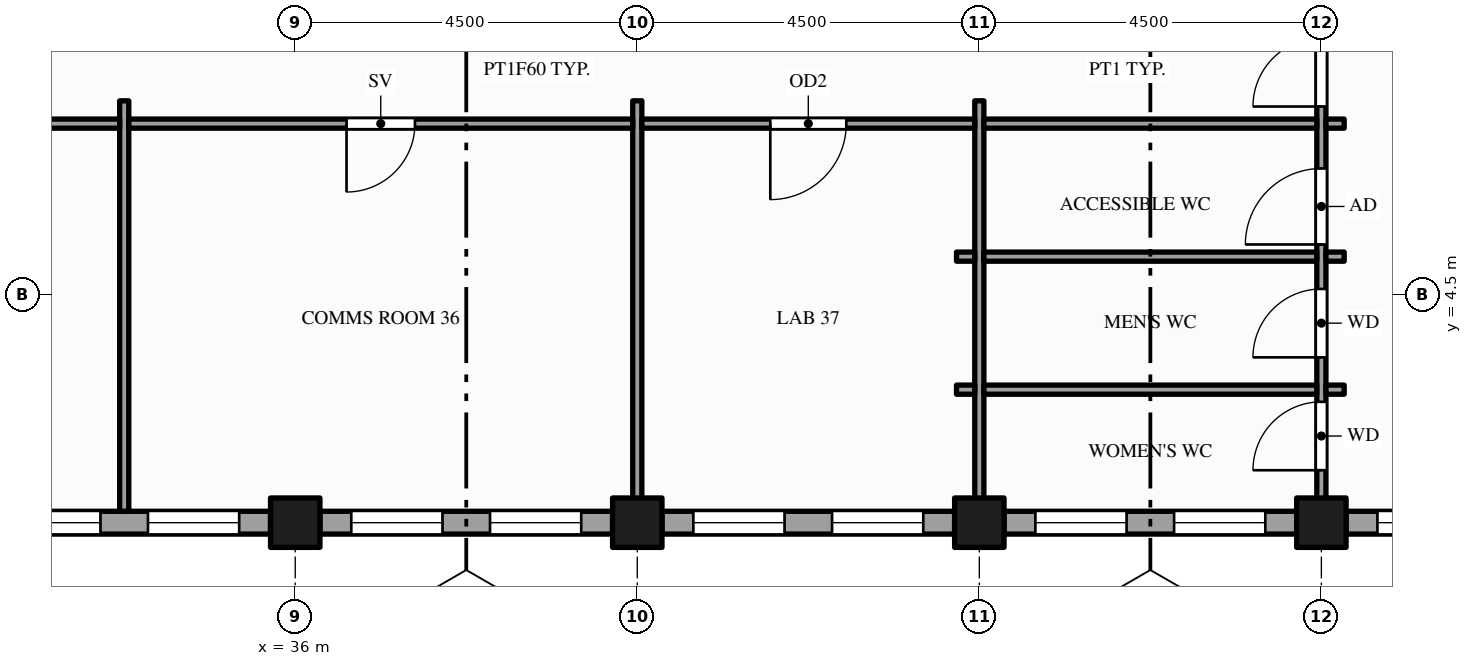
"""IFC4 building model, lengths in metres.
Left out: names, types, materials, properties, quantities, classifications, styles, units other than length and angle.
Written with IfcOpenShell. Run it as: python <this file> out.ifc"""

import sys

from ifc_helpers import new_model, si_unit, direction, frame, frame_2d, origin, origin_2d, place, context, subcontext, project, spatial, rectangle, hollow_rectangle, extrude, element, fill, save


model = new_model("IFC4")
c1 = context("Model", 3, precision=1e-05, world=origin(), true_north=direction((0.0, 1.0)))
c2 = subcontext(c1, "Body", "Model", "MODEL_VIEW")
j1 = project(units=[si_unit("LENGTHUNIT", "METRE"), si_unit("PLANEANGLEUNIT", "RADIAN")], contexts=[c1])
p1 = place(None, origin())
s1 = spatial("IfcSite", under=j1, at=p1, CompositionType="ELEMENT")
p2 = place(p1, origin())
s2 = spatial("IfcBuilding", under=s1, at=p2, CompositionType="ELEMENT")
p3 = place(p2, frame((0.0, 0.0, 273.0)))
s3 = spatial("IfcBuildingStorey", under=s2, at=p3, CompositionType="ELEMENT", Elevation=273.0)
for number, where, z_axis, x_axis in (
    (1, (36.0, 1.5, -0.15), (0.0, 0.0, 1.0), (1.0, 0.0, 0.0)),
    (2, (40.5, 1.5, -0.15), (0.0, 0.0, 1.0), (1.0, 0.0, 0.0)),
    (3, (45.0, 1.5, -0.15), (0.0, 0.0, 1.0), (1.0, 0.0, 0.0)),
    (4, (49.5, 1.5, -0.15), (0.0, 0.0, 1.0), (1.0, 0.0, 0.0)),
):
    element("IfcColumn", number, at=place(p3, frame(where, z_axis=z_axis, x_axis=x_axis)), inside=s3, PredefinedType="COLUMN", context=c2, shape_type="SweptSolid", body=[
        extrude(hollow_rectangle(XDim=0.65, YDim=0.65, WallThickness=0.032, at=origin_2d()), origin(), (0.0, 0.0, 1.0), 4.0),
    ])
p4 = place(p3, frame((31.825, 1.5, 0.0), z_axis=(0.0, 0.0, 1.0), x_axis=(1.0, 0.0, 0.0)))
e5 = element("IfcWall", 5, at=p4, inside=s3, PredefinedType="STANDARD", context=c2, shape_type="SweptSolid", body=[
    extrude(rectangle(XDim=3.85, YDim=0.3, at=frame_2d((1.925, 0.0))), origin(), (0.0, 0.0, 1.0), 2.87),
])
p5 = place(p4, frame((0.413, 0.0, 0.9)))
e6 = element("IfcOpeningElement", 6, at=p5, cuts=e5, PredefinedType="OPENING", context=c2, shape_type="SweptSolid", body=[
    extrude(rectangle(XDim=1.2, YDim=1.75, at=frame_2d((0.6, 0.875))), frame((0.0, 0.16, 0.0), z_axis=(0.0, -1.0, 0.0), x_axis=(1.0, 0.0, 0.0)), (0.0, 0.0, 1.0), 0.32),
])
p6 = place(p4, frame((2.238, 0.0, 0.9)))
e7 = element("IfcOpeningElement", 7, at=p6, cuts=e5, PredefinedType="OPENING", context=c2, shape_type="SweptSolid", body=[
    extrude(rectangle(XDim=1.2, YDim=1.75, at=frame_2d((0.6, 0.875))), frame((0.0, 0.16, 0.0), z_axis=(0.0, -1.0, 0.0), x_axis=(1.0, 0.0, 0.0)), (0.0, 0.0, 1.0), 0.32),
])
p7 = place(p3, frame((36.325, 1.5, 0.0), z_axis=(0.0, 0.0, 1.0), x_axis=(1.0, 0.0, 0.0)))
e8 = element("IfcWall", 8, at=p7, inside=s3, PredefinedType="STANDARD", context=c2, shape_type="SweptSolid", body=[
    extrude(rectangle(XDim=3.85, YDim=0.3, at=frame_2d((1.925, 0.0))), origin(), (0.0, 0.0, 1.0), 2.87),
])
p8 = place(p7, frame((0.413, 0.0, 0.9)))
e9 = element("IfcOpeningElement", 9, at=p8, cuts=e8, PredefinedType="OPENING", context=c2, shape_type="SweptSolid", body=[
    extrude(rectangle(XDim=1.2, YDim=1.75, at=frame_2d((0.6, 0.875))), frame((0.0, 0.16, 0.0), z_axis=(0.0, -1.0, 0.0), x_axis=(1.0, 0.0, 0.0)), (0.0, 0.0, 1.0), 0.32),
])
p9 = place(p7, frame((2.238, 0.0, 0.9)))
e10 = element("IfcOpeningElement", 10, at=p9, cuts=e8, PredefinedType="OPENING", context=c2, shape_type="SweptSolid", body=[
    extrude(rectangle(XDim=1.2, YDim=1.75, at=frame_2d((0.6, 0.875))), frame((0.0, 0.16, 0.0), z_axis=(0.0, -1.0, 0.0), x_axis=(1.0, 0.0, 0.0)), (0.0, 0.0, 1.0), 0.32),
])
p10 = place(p3, frame((40.825, 1.5, 0.0), z_axis=(0.0, 0.0, 1.0), x_axis=(1.0, 0.0, 0.0)))
e11 = element("IfcWall", 11, at=p10, inside=s3, PredefinedType="STANDARD", context=c2, shape_type="SweptSolid", body=[
    extrude(rectangle(XDim=3.85, YDim=0.3, at=frame_2d((1.925, 0.0))), origin(), (0.0, 0.0, 1.0), 2.87),
])
p11 = place(p10, frame((0.413, 0.0, 0.9)))
e12 = element("IfcOpeningElement", 12, at=p11, cuts=e11, PredefinedType="OPENING", context=c2, shape_type="SweptSolid", body=[
    extrude(rectangle(XDim=1.2, YDim=1.75, at=frame_2d((0.6, 0.875))), frame((0.0, 0.16, 0.0), z_axis=(0.0, -1.0, 0.0), x_axis=(1.0, 0.0, 0.0)), (0.0, 0.0, 1.0), 0.32),
])
p12 = place(p10, frame((2.238, 0.0, 0.9)))
e13 = element("IfcOpeningElement", 13, at=p12, cuts=e11, PredefinedType="OPENING", context=c2, shape_type="SweptSolid", body=[
    extrude(rectangle(XDim=1.2, YDim=1.75, at=frame_2d((0.6, 0.875))), frame((0.0, 0.16, 0.0), z_axis=(0.0, -1.0, 0.0), x_axis=(1.0, 0.0, 0.0)), (0.0, 0.0, 1.0), 0.32),
])
p13 = place(p3, frame((45.325, 1.5, 0.0), z_axis=(0.0, 0.0, 1.0), x_axis=(1.0, 0.0, 0.0)))
e14 = element("IfcWall", 14, at=p13, inside=s3, PredefinedType="STANDARD", context=c2, shape_type="SweptSolid", body=[
    extrude(rectangle(XDim=3.85, YDim=0.3, at=frame_2d((1.925, 0.0))), origin(), (0.0, 0.0, 1.0), 2.87),
])
p14 = place(p13, frame((0.413, 0.0, 0.9)))
e15 = element("IfcOpeningElement", 15, at=p14, cuts=e14, PredefinedType="OPENING", context=c2, shape_type="SweptSolid", body=[
    extrude(rectangle(XDim=1.2, YDim=1.75, at=frame_2d((0.6, 0.875))), frame((0.0, 0.16, 0.0), z_axis=(0.0, -1.0, 0.0), x_axis=(1.0, 0.0, 0.0)), (0.0, 0.0, 1.0), 0.32),
])
p15 = place(p13, frame((2.238, 0.0, 0.9)))
e16 = element("IfcOpeningElement", 16, at=p15, cuts=e14, PredefinedType="OPENING", context=c2, shape_type="SweptSolid", body=[
    extrude(rectangle(XDim=1.2, YDim=1.75, at=frame_2d((0.6, 0.875))), frame((0.0, 0.16, 0.0), z_axis=(0.0, -1.0, 0.0), x_axis=(1.0, 0.0, 0.0)), (0.0, 0.0, 1.0), 0.32),
])
p16 = place(p3, frame((49.825, 1.5, 0.0), z_axis=(0.0, 0.0, 1.0), x_axis=(1.0, 0.0, 0.0)))
e17 = element("IfcWall", 17, at=p16, inside=s3, PredefinedType="STANDARD", context=c2, shape_type="SweptSolid", body=[
    extrude(rectangle(XDim=4.175, YDim=0.3, at=frame_2d((2.087, 0.0))), origin(), (0.0, 0.0, 1.0), 2.87),
])
p17 = place(p16, frame((0.413, 0.0, 0.9)))
e18 = element("IfcOpeningElement", 18, at=p17, cuts=e17, PredefinedType="OPENING", context=c2, shape_type="SweptSolid", body=[
    extrude(rectangle(XDim=1.2, YDim=1.75, at=frame_2d((0.6, 0.875))), frame((0.0, 0.16, 0.0), z_axis=(0.0, -1.0, 0.0), x_axis=(1.0, 0.0, 0.0)), (0.0, 0.0, 1.0), 0.32),
])
p18 = place(p16, frame((2.225, 0.0, 0.9)))
e19 = element("IfcOpeningElement", 19, at=p18, cuts=e17, PredefinedType="OPENING", context=c2, shape_type="SweptSolid", body=[
    extrude(rectangle(XDim=1.55, YDim=1.75, at=frame_2d((0.775, 0.875))), frame((0.0, 0.16, 0.0), z_axis=(0.0, -1.0, 0.0), x_axis=(1.0, 0.0, 0.0)), (0.0, 0.0, 1.0), 0.32),
])
for number, where, z_axis, x_axis in (
    (20, (33.75, 1.65, 0.0), (0.0, 0.0, 1.0), (0.0, 1.0, 0.0)),
    (21, (40.5, 1.65, 0.0), (0.0, 0.0, 1.0), (0.0, 1.0, 0.0)),
    (22, (45.0, 1.65, 0.0), (0.0, 0.0, 1.0), (0.0, 1.0, 0.0)),
):
    element("IfcWall", number, at=place(p3, frame(where, z_axis=z_axis, x_axis=x_axis)), inside=s3, PredefinedType="PARTITIONING", context=c2, shape_type="SweptSolid", body=[
        extrude(rectangle(XDim=5.4, YDim=0.12, at=frame_2d((2.7, 0.0))), origin(), (0.0, 0.0, 1.0), 2.87),
    ])
p19 = place(p3, frame((49.5, 1.65, 0.0), z_axis=(0.0, 0.0, 1.0), x_axis=(0.0, 1.0, 0.0)))
e23 = element("IfcWall", 23, at=p19, inside=s3, PredefinedType="PARTITIONING", context=c2, shape_type="SweptSolid", body=[
    extrude(rectangle(XDim=22.2, YDim=0.12, at=frame_2d((11.1, 0.0))), origin(), (0.0, 0.0, 1.0), 2.87),
])
p20 = place(p19, frame((5.325, 0.0, 0.0)))
e24 = element("IfcOpeningElement", 24, at=p20, cuts=e23, PredefinedType="OPENING", context=c2, shape_type="SweptSolid", body=[
    extrude(rectangle(XDim=1.8, YDim=2.1, at=frame_2d((0.9, 1.05))), frame((0.0, 0.07, 0.0), z_axis=(0.0, -1.0, 0.0), x_axis=(1.0, 0.0, 0.0)), (0.0, 0.0, 1.0), 0.14),
])
p21 = place(p19, frame((0.54, 0.0, 0.0)))
e25 = element("IfcOpeningElement", 25, at=p21, cuts=e23, PredefinedType="OPENING", context=c2, shape_type="SweptSolid", body=[
    extrude(rectangle(XDim=0.9, YDim=2.1, at=frame_2d((0.45, 1.05))), frame((0.0, 0.07, 0.0), z_axis=(0.0, -1.0, 0.0), x_axis=(1.0, 0.0, 0.0)), (0.0, 0.0, 1.0), 0.14),
])
p22 = place(p19, frame((2.025, 0.0, 0.0)))
e26 = element("IfcOpeningElement", 26, at=p22, cuts=e23, PredefinedType="OPENING", context=c2, shape_type="SweptSolid", body=[
    extrude(rectangle(XDim=0.9, YDim=2.1, at=frame_2d((0.45, 1.05))), frame((0.0, 0.07, 0.0), z_axis=(0.0, -1.0, 0.0), x_axis=(1.0, 0.0, 0.0)), (0.0, 0.0, 1.0), 0.14),
])
p23 = place(p19, frame((3.51, 0.0, 0.0)))
e27 = element("IfcOpeningElement", 27, at=p23, cuts=e23, PredefinedType="OPENING", context=c2, shape_type="SweptSolid", body=[
    extrude(rectangle(XDim=1.0, YDim=2.1, at=frame_2d((0.5, 1.05))), frame((0.0, 0.07, 0.0), z_axis=(0.0, -1.0, 0.0), x_axis=(1.0, 0.0, 0.0)), (0.0, 0.0, 1.0), 0.14),
])
p24 = place(p3, frame((44.7, 3.25, 0.0), z_axis=(0.0, 0.0, 1.0), x_axis=(1.0, 0.0, 0.0)))
e28 = element("IfcWall", 28, at=p24, inside=s3, PredefinedType="PARTITIONING", context=c2, shape_type="SweptSolid", body=[
    extrude(rectangle(XDim=0.24, YDim=0.12, at=frame_2d((0.12, 0.0))), origin(), (0.0, 0.0, 1.0), 2.87),
])
p25 = place(p3, frame((45.06, 3.25, 0.0), z_axis=(0.0, 0.0, 1.0), x_axis=(1.0, 0.0, 0.0)))
e29 = element("IfcWall", 29, at=p25, inside=s3, PredefinedType="PARTITIONING", context=c2, shape_type="SweptSolid", body=[
    extrude(rectangle(XDim=4.38, YDim=0.12, at=frame_2d((2.19, 0.0))), origin(), (0.0, 0.0, 1.0), 2.87),
])
for number, where, z_axis, x_axis in (
    (30, (49.56, 3.25, 0.0), (0.0, 0.0, 1.0), (1.0, 0.0, 0.0)),
    (31, (44.7, 5.0, 0.0), (0.0, 0.0, 1.0), (1.0, 0.0, 0.0)),
):
    element("IfcWall", number, at=place(p3, frame(where, z_axis=z_axis, x_axis=x_axis)), inside=s3, PredefinedType="PARTITIONING", context=c2, shape_type="SweptSolid", body=[
        extrude(rectangle(XDim=0.24, YDim=0.12, at=frame_2d((0.12, 0.0))), origin(), (0.0, 0.0, 1.0), 2.87),
    ])
p26 = place(p3, frame((45.06, 5.0, 0.0), z_axis=(0.0, 0.0, 1.0), x_axis=(1.0, 0.0, 0.0)))
e32 = element("IfcWall", 32, at=p26, inside=s3, PredefinedType="PARTITIONING", context=c2, shape_type="SweptSolid", body=[
    extrude(rectangle(XDim=4.38, YDim=0.12, at=frame_2d((2.19, 0.0))), origin(), (0.0, 0.0, 1.0), 2.87),
])
p27 = place(p3, frame((49.56, 5.0, 0.0), z_axis=(0.0, 0.0, 1.0), x_axis=(1.0, 0.0, 0.0)))
e33 = element("IfcWall", 33, at=p27, inside=s3, PredefinedType="PARTITIONING", context=c2, shape_type="SweptSolid", body=[
    extrude(rectangle(XDim=0.24, YDim=0.12, at=frame_2d((0.12, 0.0))), origin(), (0.0, 0.0, 1.0), 2.87),
])
p28 = place(p3, frame((27.06, 6.75, 0.0), z_axis=(0.0, 0.0, 1.0), x_axis=(1.0, 0.0, 0.0)))
e34 = element("IfcWall", 34, at=p28, inside=s3, PredefinedType="PARTITIONING", context=c2, shape_type="SweptSolid", body=[
    extrude(rectangle(XDim=6.63, YDim=0.12, at=frame_2d((3.315, 0.0))), origin(), (0.0, 0.0, 1.0), 2.87),
])
p29 = place(p28, frame((2.815, 0.0, 0.0)))
e35 = element("IfcOpeningElement", 35, at=p29, cuts=e34, PredefinedType="OPENING", context=c2, shape_type="SweptSolid", body=[
    extrude(rectangle(XDim=1.0, YDim=2.1, at=frame_2d((0.5, 1.05))), frame((0.0, 0.07, 0.0), z_axis=(0.0, -1.0, 0.0), x_axis=(1.0, 0.0, 0.0)), (0.0, 0.0, 1.0), 0.14),
])
p30 = place(p3, frame((33.81, 6.75, 0.0), z_axis=(0.0, 0.0, 1.0), x_axis=(1.0, 0.0, 0.0)))
e36 = element("IfcWall", 36, at=p30, inside=s3, PredefinedType="PARTITIONING", context=c2, shape_type="SweptSolid", body=[
    extrude(rectangle(XDim=6.63, YDim=0.12, at=frame_2d((3.315, 0.0))), origin(), (0.0, 0.0, 1.0), 2.87),
])
p31 = place(p30, frame((2.865, 0.0, 0.0)))
e37 = element("IfcOpeningElement", 37, at=p31, cuts=e36, PredefinedType="OPENING", context=c2, shape_type="SweptSolid", body=[
    extrude(rectangle(XDim=0.9, YDim=2.1, at=frame_2d((0.45, 1.05))), frame((0.0, 0.07, 0.0), z_axis=(0.0, -1.0, 0.0), x_axis=(1.0, 0.0, 0.0)), (0.0, 0.0, 1.0), 0.14),
])
p32 = place(p3, frame((40.56, 6.75, 0.0), z_axis=(0.0, 0.0, 1.0), x_axis=(1.0, 0.0, 0.0)))
e38 = element("IfcWall", 38, at=p32, inside=s3, PredefinedType="PARTITIONING", context=c2, shape_type="SweptSolid", body=[
    extrude(rectangle(XDim=4.38, YDim=0.12, at=frame_2d((2.19, 0.0))), origin(), (0.0, 0.0, 1.0), 2.87),
])
p33 = place(p32, frame((1.69, 0.0, 0.0)))
e39 = element("IfcOpeningElement", 39, at=p33, cuts=e38, PredefinedType="OPENING", context=c2, shape_type="SweptSolid", body=[
    extrude(rectangle(XDim=1.0, YDim=2.1, at=frame_2d((0.5, 1.05))), frame((0.0, 0.07, 0.0), z_axis=(0.0, -1.0, 0.0), x_axis=(1.0, 0.0, 0.0)), (0.0, 0.0, 1.0), 0.14),
])
p34 = place(p3, frame((45.06, 6.75, 0.0), z_axis=(0.0, 0.0, 1.0), x_axis=(1.0, 0.0, 0.0)))
e40 = element("IfcWall", 40, at=p34, inside=s3, PredefinedType="PARTITIONING", context=c2, shape_type="SweptSolid", body=[
    extrude(rectangle(XDim=4.38, YDim=0.12, at=frame_2d((2.19, 0.0))), origin(), (0.0, 0.0, 1.0), 2.87),
])
p35 = place(p3, frame((49.56, 6.75, 0.0), z_axis=(0.0, 0.0, 1.0), x_axis=(1.0, 0.0, 0.0)))
e41 = element("IfcWall", 41, at=p35, inside=s3, PredefinedType="PARTITIONING", context=c2, shape_type="SweptSolid", body=[
    extrude(rectangle(XDim=0.24, YDim=0.12, at=frame_2d((0.12, 0.0))), origin(), (0.0, 0.0, 1.0), 2.87),
])
p36 = place(p5, origin())
e42 = element("IfcWindow", 42, at=p36, inside=s3, PartitioningType="SINGLE_PANEL", PredefinedType="WINDOW", context=c2, shape_type="SweptSolid", body=[
    extrude(rectangle(XDim=1.2, YDim=1.75, at=frame_2d((0.6, 0.875))), frame((0.0, 0.03, 0.0), z_axis=(0.0, -1.0, 0.0), x_axis=(1.0, 0.0, 0.0)), (0.0, 0.0, 1.0), 0.06),
])
fill(e6, e42)
p37 = place(p6, origin())
e43 = element("IfcWindow", 43, at=p37, inside=s3, PartitioningType="SINGLE_PANEL", PredefinedType="WINDOW", context=c2, shape_type="SweptSolid", body=[
    extrude(rectangle(XDim=1.2, YDim=1.75, at=frame_2d((0.6, 0.875))), frame((0.0, 0.03, 0.0), z_axis=(0.0, -1.0, 0.0), x_axis=(1.0, 0.0, 0.0)), (0.0, 0.0, 1.0), 0.06),
])
fill(e7, e43)
p38 = place(p8, origin())
e44 = element("IfcWindow", 44, at=p38, inside=s3, PartitioningType="SINGLE_PANEL", PredefinedType="WINDOW", context=c2, shape_type="SweptSolid", body=[
    extrude(rectangle(XDim=1.2, YDim=1.75, at=frame_2d((0.6, 0.875))), frame((0.0, 0.03, 0.0), z_axis=(0.0, -1.0, 0.0), x_axis=(1.0, 0.0, 0.0)), (0.0, 0.0, 1.0), 0.06),
])
fill(e9, e44)
p39 = place(p9, origin())
e45 = element("IfcWindow", 45, at=p39, inside=s3, PartitioningType="SINGLE_PANEL", PredefinedType="WINDOW", context=c2, shape_type="SweptSolid", body=[
    extrude(rectangle(XDim=1.2, YDim=1.75, at=frame_2d((0.6, 0.875))), frame((0.0, 0.03, 0.0), z_axis=(0.0, -1.0, 0.0), x_axis=(1.0, 0.0, 0.0)), (0.0, 0.0, 1.0), 0.06),
])
fill(e10, e45)
p40 = place(p11, origin())
e46 = element("IfcWindow", 46, at=p40, inside=s3, PartitioningType="SINGLE_PANEL", PredefinedType="WINDOW", context=c2, shape_type="SweptSolid", body=[
    extrude(rectangle(XDim=1.2, YDim=1.75, at=frame_2d((0.6, 0.875))), frame((0.0, 0.03, 0.0), z_axis=(0.0, -1.0, 0.0), x_axis=(1.0, 0.0, 0.0)), (0.0, 0.0, 1.0), 0.06),
])
fill(e12, e46)
p41 = place(p12, origin())
e47 = element("IfcWindow", 47, at=p41, inside=s3, PartitioningType="SINGLE_PANEL", PredefinedType="WINDOW", context=c2, shape_type="SweptSolid", body=[
    extrude(rectangle(XDim=1.2, YDim=1.75, at=frame_2d((0.6, 0.875))), frame((0.0, 0.03, 0.0), z_axis=(0.0, -1.0, 0.0), x_axis=(1.0, 0.0, 0.0)), (0.0, 0.0, 1.0), 0.06),
])
fill(e13, e47)
p42 = place(p14, origin())
e48 = element("IfcWindow", 48, at=p42, inside=s3, PartitioningType="SINGLE_PANEL", PredefinedType="WINDOW", context=c2, shape_type="SweptSolid", body=[
    extrude(rectangle(XDim=1.2, YDim=1.75, at=frame_2d((0.6, 0.875))), frame((0.0, 0.03, 0.0), z_axis=(0.0, -1.0, 0.0), x_axis=(1.0, 0.0, 0.0)), (0.0, 0.0, 1.0), 0.06),
])
fill(e15, e48)
p43 = place(p15, origin())
e49 = element("IfcWindow", 49, at=p43, inside=s3, PartitioningType="SINGLE_PANEL", PredefinedType="WINDOW", context=c2, shape_type="SweptSolid", body=[
    extrude(rectangle(XDim=1.2, YDim=1.75, at=frame_2d((0.6, 0.875))), frame((0.0, 0.03, 0.0), z_axis=(0.0, -1.0, 0.0), x_axis=(1.0, 0.0, 0.0)), (0.0, 0.0, 1.0), 0.06),
])
fill(e16, e49)
p44 = place(p17, origin())
e50 = element("IfcWindow", 50, at=p44, inside=s3, PartitioningType="SINGLE_PANEL", PredefinedType="WINDOW", context=c2, shape_type="SweptSolid", body=[
    extrude(rectangle(XDim=1.2, YDim=1.75, at=frame_2d((0.6, 0.875))), frame((0.0, 0.03, 0.0), z_axis=(0.0, -1.0, 0.0), x_axis=(1.0, 0.0, 0.0)), (0.0, 0.0, 1.0), 0.06),
])
fill(e18, e50)
p45 = place(p20, origin())
e51 = element("IfcDoor", 51, at=p45, inside=s3, OperationType="DOUBLE_DOOR_SINGLE_SWING", PredefinedType="DOOR", context=c2, shape_type="SweptSolid", body=[
    extrude(rectangle(XDim=1.8, YDim=2.1, at=frame_2d((0.9, 1.05))), frame((0.0, 0.025, 0.0), z_axis=(0.0, -1.0, 0.0), x_axis=(1.0, 0.0, 0.0)), (0.0, 0.0, 1.0), 0.05),
])
fill(e24, e51)
p46 = place(p31, origin())
e52 = element("IfcDoor", 52, at=p46, inside=s3, OperationType="SINGLE_SWING_LEFT", PredefinedType="DOOR", context=c2, shape_type="SweptSolid", body=[
    extrude(rectangle(XDim=0.9, YDim=2.1, at=frame_2d((0.45, 1.05))), frame((0.0, 0.025, 0.0), z_axis=(0.0, -1.0, 0.0), x_axis=(1.0, 0.0, 0.0)), (0.0, 0.0, 1.0), 0.05),
])
fill(e37, e52)
p47 = place(p33, origin())
e53 = element("IfcDoor", 53, at=p47, inside=s3, OperationType="SINGLE_SWING_LEFT", PredefinedType="DOOR", context=c2, shape_type="SweptSolid", body=[
    extrude(rectangle(XDim=1.0, YDim=2.1, at=frame_2d((0.5, 1.05))), frame((0.0, 0.025, 0.0), z_axis=(0.0, -1.0, 0.0), x_axis=(1.0, 0.0, 0.0)), (0.0, 0.0, 1.0), 0.05),
])
fill(e39, e53)
p48 = place(p21, origin())
e54 = element("IfcDoor", 54, at=p48, inside=s3, OperationType="SINGLE_SWING_LEFT", PredefinedType="DOOR", context=c2, shape_type="SweptSolid", body=[
    extrude(rectangle(XDim=0.9, YDim=2.1, at=frame_2d((0.45, 1.05))), frame((0.0, 0.025, 0.0), z_axis=(0.0, -1.0, 0.0), x_axis=(1.0, 0.0, 0.0)), (0.0, 0.0, 1.0), 0.05),
])
fill(e25, e54)
p49 = place(p22, origin())
e55 = element("IfcDoor", 55, at=p49, inside=s3, OperationType="SINGLE_SWING_LEFT", PredefinedType="DOOR", context=c2, shape_type="SweptSolid", body=[
    extrude(rectangle(XDim=0.9, YDim=2.1, at=frame_2d((0.45, 1.05))), frame((0.0, 0.025, 0.0), z_axis=(0.0, -1.0, 0.0), x_axis=(1.0, 0.0, 0.0)), (0.0, 0.0, 1.0), 0.05),
])
fill(e26, e55)
p50 = place(p23, origin())
e56 = element("IfcDoor", 56, at=p50, inside=s3, OperationType="SINGLE_SWING_LEFT", PredefinedType="DOOR", context=c2, shape_type="SweptSolid", body=[
    extrude(rectangle(XDim=1.0, YDim=2.1, at=frame_2d((0.5, 1.05))), frame((0.0, 0.025, 0.0), z_axis=(0.0, -1.0, 0.0), x_axis=(1.0, 0.0, 0.0)), (0.0, 0.0, 1.0), 0.05),
])
fill(e27, e56)
save(model, sys.argv[1])
